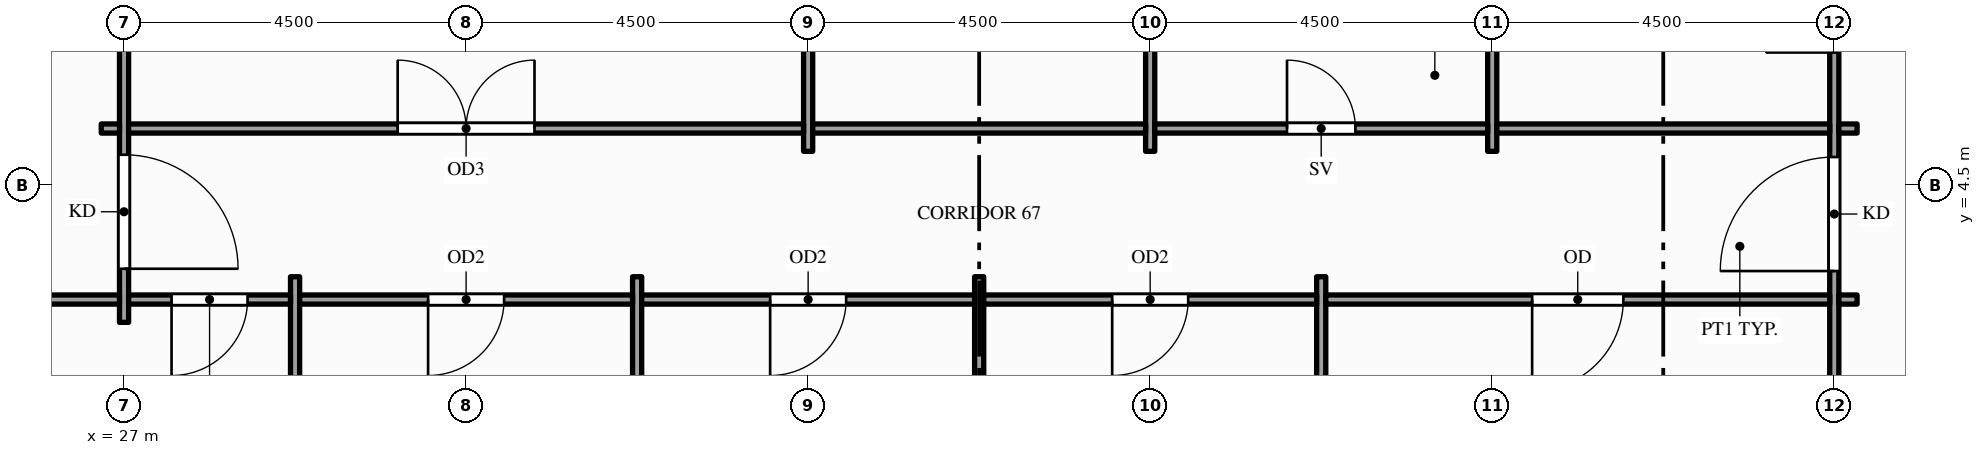
"""IFC4 building model, lengths in metres.
Left out: names, types, materials, properties, quantities, classifications, styles, units other than length and angle.
Written with IfcOpenShell. Run it as: python <this file> out.ifc"""

import sys

from ifc_helpers import new_model, si_unit, direction, frame, frame_2d, origin, place, context, subcontext, project, spatial, rectangle, extrude, element, fill, save


model = new_model("IFC4")
c1 = context("Model", 3, precision=1e-05, world=origin(), true_north=direction((0.0, 1.0)))
c2 = subcontext(c1, "Body", "Model", "MODEL_VIEW")
j1 = project(units=[si_unit("LENGTHUNIT", "METRE"), si_unit("PLANEANGLEUNIT", "RADIAN")], contexts=[c1])
p1 = place(None, origin())
s1 = spatial("IfcSite", under=j1, at=p1, CompositionType="ELEMENT")
p2 = place(p1, origin())
s2 = spatial("IfcBuilding", under=s1, at=p2, CompositionType="ELEMENT")
p3 = place(p2, frame((0.0, 0.0, 199.0)))
s3 = spatial("IfcBuildingStorey", under=s2, at=p3, CompositionType="ELEMENT", Elevation=199.0)
p4 = place(p3, frame((27.0, 2.7, 0.0), z_axis=(0.0, 0.0, 1.0), x_axis=(0.0, 1.0, 0.0)))
e1 = element("IfcWall", 1, at=p4, inside=s3, PredefinedType="PARTITIONING", context=c2, shape_type="SweptSolid", body=[
    extrude(rectangle(XDim=14.1, YDim=0.12, at=frame_2d((7.05, 0.0))), origin(), (0.0, 0.0, 1.0), 2.87),
])
p5 = place(p4, frame((0.705, 0.0, 0.0)))
e2 = element("IfcOpeningElement", 2, at=p5, cuts=e1, PredefinedType="OPENING", context=c2, shape_type="SweptSolid", body=[
    extrude(rectangle(XDim=1.5, YDim=2.1, at=frame_2d((0.75, 1.05))), frame((0.0, 0.07, 0.0), z_axis=(0.0, -1.0, 0.0), x_axis=(1.0, 0.0, 0.0)), (0.0, 0.0, 1.0), 0.14),
])
p6 = place(p4, frame((11.895, 0.0, 0.0)))
e3 = element("IfcOpeningElement", 3, at=p6, cuts=e1, PredefinedType="OPENING", context=c2, shape_type="SweptSolid", body=[
    extrude(rectangle(XDim=1.5, YDim=2.1, at=frame_2d((0.75, 1.05))), frame((0.0, 0.07, 0.0), z_axis=(0.0, -1.0, 0.0), x_axis=(1.0, 0.0, 0.0)), (0.0, 0.0, 1.0), 0.14),
])
for number, where, z_axis, x_axis in (
    (4, (29.25, -1.35, 0.0), (0.0, 0.0, 1.0), (0.0, 1.0, 0.0)),
    (5, (33.75, -1.35, 0.0), (0.0, 0.0, 1.0), (0.0, 1.0, 0.0)),
):
    element("IfcWall", number, at=place(p3, frame(where, z_axis=z_axis, x_axis=x_axis)), inside=s3, PredefinedType="PARTITIONING", context=c2, shape_type="SweptSolid", body=[
        extrude(rectangle(XDim=4.65, YDim=0.12, at=frame_2d((2.325, 0.0))), origin(), (0.0, 0.0, 1.0), 2.87),
    ])
p7 = place(p3, frame((36.0, 4.95, 0.0), z_axis=(0.0, 0.0, 1.0), x_axis=(0.0, 1.0, 0.0)))
e6 = element("IfcWall", 6, at=p7, inside=s3, PredefinedType="PARTITIONING", context=c2, shape_type="SweptSolid", body=[
    extrude(rectangle(XDim=9.6, YDim=0.12, at=frame_2d((4.8, 0.0))), origin(), (0.0, 0.0, 1.0), 2.87),
])
p8 = place(p3, frame((38.25, -1.35, 0.0), z_axis=(0.0, 0.0, 1.0), x_axis=(0.0, 1.0, 0.0)))
e7 = element("IfcWall", 7, at=p8, inside=s3, PredefinedType="PARTITIONING", context=c2, shape_type="SweptSolid", body=[
    extrude(rectangle(XDim=4.65, YDim=0.12, at=frame_2d((2.325, 0.0))), origin(), (0.0, 0.0, 1.0), 2.87),
])
p9 = place(p3, frame((40.5, 4.95, 0.0), z_axis=(0.0, 0.0, 1.0), x_axis=(0.0, 1.0, 0.0)))
e8 = element("IfcWall", 8, at=p9, inside=s3, PredefinedType="PARTITIONING", context=c2, shape_type="SweptSolid", body=[
    extrude(rectangle(XDim=9.6, YDim=0.12, at=frame_2d((4.8, 0.0))), origin(), (0.0, 0.0, 1.0), 2.87),
])
p10 = place(p3, frame((42.75, -1.35, 0.0), z_axis=(0.0, 0.0, 1.0), x_axis=(0.0, 1.0, 0.0)))
e9 = element("IfcWall", 9, at=p10, inside=s3, PredefinedType="PARTITIONING", context=c2, shape_type="SweptSolid", body=[
    extrude(rectangle(XDim=4.65, YDim=0.12, at=frame_2d((2.325, 0.0))), origin(), (0.0, 0.0, 1.0), 2.87),
])
p11 = place(p3, frame((45.0, 4.95, 0.0), z_axis=(0.0, 0.0, 1.0), x_axis=(0.0, 1.0, 0.0)))
e10 = element("IfcWall", 10, at=p11, inside=s3, PredefinedType="PARTITIONING", context=c2, shape_type="SweptSolid", body=[
    extrude(rectangle(XDim=9.6, YDim=0.12, at=frame_2d((4.8, 0.0))), origin(), (0.0, 0.0, 1.0), 2.87),
])
p12 = place(p3, frame((49.5, -1.35, 0.0), z_axis=(0.0, 0.0, 1.0), x_axis=(0.0, 1.0, 0.0)))
e11 = element("IfcWall", 11, at=p12, inside=s3, PredefinedType="PARTITIONING", context=c2, shape_type="SweptSolid", body=[
    extrude(rectangle(XDim=22.2, YDim=0.12, at=frame_2d((11.1, 0.0))), origin(), (0.0, 0.0, 1.0), 2.87),
])
p13 = place(p12, frame((4.725, 0.0, 0.0)))
e12 = element("IfcOpeningElement", 12, at=p13, cuts=e11, PredefinedType="OPENING", context=c2, shape_type="SweptSolid", body=[
    extrude(rectangle(XDim=1.5, YDim=2.1, at=frame_2d((0.75, 1.05))), frame((0.0, 0.07, 0.0), z_axis=(0.0, -1.0, 0.0), x_axis=(1.0, 0.0, 0.0)), (0.0, 0.0, 1.0), 0.14),
])
p14 = place(p12, frame((15.975, 0.0, 0.0)))
e13 = element("IfcOpeningElement", 13, at=p14, cuts=e11, PredefinedType="OPENING", context=c2, shape_type="SweptSolid", body=[
    extrude(rectangle(XDim=1.5, YDim=2.1, at=frame_2d((0.75, 1.05))), frame((0.0, 0.07, 0.0), z_axis=(0.0, -1.0, 0.0), x_axis=(1.0, 0.0, 0.0)), (0.0, 0.0, 1.0), 0.14),
])
p15 = place(p12, frame((7.6, 0.0, 0.0)))
e14 = element("IfcOpeningElement", 14, at=p15, cuts=e11, PredefinedType="OPENING", context=c2, shape_type="SweptSolid", body=[
    extrude(rectangle(XDim=0.9, YDim=2.1, at=frame_2d((0.45, 1.05))), frame((0.0, 0.07, 0.0), z_axis=(0.0, -1.0, 0.0), x_axis=(1.0, 0.0, 0.0)), (0.0, 0.0, 1.0), 0.14),
])
p16 = place(p12, frame((10.65, 0.0, 0.0)))
e15 = element("IfcOpeningElement", 15, at=p16, cuts=e11, PredefinedType="OPENING", context=c2, shape_type="SweptSolid", body=[
    extrude(rectangle(XDim=0.9, YDim=2.1, at=frame_2d((0.45, 1.05))), frame((0.0, 0.07, 0.0), z_axis=(0.0, -1.0, 0.0), x_axis=(1.0, 0.0, 0.0)), (0.0, 0.0, 1.0), 0.14),
])
p17 = place(p12, frame((13.6, 0.0, 0.0)))
e16 = element("IfcOpeningElement", 16, at=p17, cuts=e11, PredefinedType="OPENING", context=c2, shape_type="SweptSolid", body=[
    extrude(rectangle(XDim=1.0, YDim=2.1, at=frame_2d((0.5, 1.05))), frame((0.0, 0.07, 0.0), z_axis=(0.0, -1.0, 0.0), x_axis=(1.0, 0.0, 0.0)), (0.0, 0.0, 1.0), 0.14),
])
p18 = place(p3, frame((24.81, 3.0, 0.0), z_axis=(0.0, 0.0, 1.0), x_axis=(1.0, 0.0, 0.0)))
e17 = element("IfcWall", 17, at=p18, inside=s3, PredefinedType="PARTITIONING", context=c2, shape_type="SweptSolid", body=[
    extrude(rectangle(XDim=2.13, YDim=0.12, at=frame_2d((1.065, 0.0))), origin(), (0.0, 0.0, 1.0), 2.76),
])
p19 = place(p3, frame((27.06, 3.0, 0.0), z_axis=(0.0, 0.0, 1.0), x_axis=(1.0, 0.0, 0.0)))
e18 = element("IfcWall", 18, at=p19, inside=s3, PredefinedType="PARTITIONING", context=c2, shape_type="SweptSolid", body=[
    extrude(rectangle(XDim=2.13, YDim=0.12, at=frame_2d((1.065, 0.0))), origin(), (0.0, 0.0, 1.0), 2.87),
])
p20 = place(p19, frame((0.565, 0.0, 0.0)))
e19 = element("IfcOpeningElement", 19, at=p20, cuts=e18, PredefinedType="OPENING", context=c2, shape_type="SweptSolid", body=[
    extrude(rectangle(XDim=1.0, YDim=2.1, at=frame_2d((0.5, 1.05))), frame((0.0, 0.07, 0.0), z_axis=(0.0, -1.0, 0.0), x_axis=(1.0, 0.0, 0.0)), (0.0, 0.0, 1.0), 0.14),
])
p21 = place(p3, frame((29.31, 3.0, 0.0), z_axis=(0.0, 0.0, 1.0), x_axis=(1.0, 0.0, 0.0)))
e20 = element("IfcWall", 20, at=p21, inside=s3, PredefinedType="PARTITIONING", context=c2, shape_type="SweptSolid", body=[
    extrude(rectangle(XDim=4.38, YDim=0.12, at=frame_2d((2.19, 0.0))), origin(), (0.0, 0.0, 1.0), 2.87),
])
p22 = place(p21, frame((1.69, 0.0, 0.0)))
e21 = element("IfcOpeningElement", 21, at=p22, cuts=e20, PredefinedType="OPENING", context=c2, shape_type="SweptSolid", body=[
    extrude(rectangle(XDim=1.0, YDim=2.1, at=frame_2d((0.5, 1.05))), frame((0.0, 0.07, 0.0), z_axis=(0.0, -1.0, 0.0), x_axis=(1.0, 0.0, 0.0)), (0.0, 0.0, 1.0), 0.14),
])
p23 = place(p3, frame((33.81, 3.0, 0.0), z_axis=(0.0, 0.0, 1.0), x_axis=(1.0, 0.0, 0.0)))
e22 = element("IfcWall", 22, at=p23, inside=s3, PredefinedType="PARTITIONING", context=c2, shape_type="SweptSolid", body=[
    extrude(rectangle(XDim=4.38, YDim=0.12, at=frame_2d((2.19, 0.0))), origin(), (0.0, 0.0, 1.0), 2.87),
])
p24 = place(p23, frame((1.69, 0.0, 0.0)))
e23 = element("IfcOpeningElement", 23, at=p24, cuts=e22, PredefinedType="OPENING", context=c2, shape_type="SweptSolid", body=[
    extrude(rectangle(XDim=1.0, YDim=2.1, at=frame_2d((0.5, 1.05))), frame((0.0, 0.07, 0.0), z_axis=(0.0, -1.0, 0.0), x_axis=(1.0, 0.0, 0.0)), (0.0, 0.0, 1.0), 0.14),
])
p25 = place(p3, frame((38.31, 3.0, 0.0), z_axis=(0.0, 0.0, 1.0), x_axis=(1.0, 0.0, 0.0)))
e24 = element("IfcWall", 24, at=p25, inside=s3, PredefinedType="PARTITIONING", context=c2, shape_type="SweptSolid", body=[
    extrude(rectangle(XDim=4.38, YDim=0.12, at=frame_2d((2.19, 0.0))), origin(), (0.0, 0.0, 1.0), 2.87),
])
p26 = place(p25, frame((1.69, 0.0, 0.0)))
e25 = element("IfcOpeningElement", 25, at=p26, cuts=e24, PredefinedType="OPENING", context=c2, shape_type="SweptSolid", body=[
    extrude(rectangle(XDim=1.0, YDim=2.1, at=frame_2d((0.5, 1.05))), frame((0.0, 0.07, 0.0), z_axis=(0.0, -1.0, 0.0), x_axis=(1.0, 0.0, 0.0)), (0.0, 0.0, 1.0), 0.14),
])
p27 = place(p3, frame((42.81, 3.0, 0.0), z_axis=(0.0, 0.0, 1.0), x_axis=(1.0, 0.0, 0.0)))
e26 = element("IfcWall", 26, at=p27, inside=s3, PredefinedType="PARTITIONING", context=c2, shape_type="SweptSolid", body=[
    extrude(rectangle(XDim=6.63, YDim=0.12, at=frame_2d((3.315, 0.0))), origin(), (0.0, 0.0, 1.0), 2.87),
])
p28 = place(p27, frame((2.715, 0.0, 0.0)))
e27 = element("IfcOpeningElement", 27, at=p28, cuts=e26, PredefinedType="OPENING", context=c2, shape_type="SweptSolid", body=[
    extrude(rectangle(XDim=1.2, YDim=2.1, at=frame_2d((0.6, 1.05))), frame((0.0, 0.07, 0.0), z_axis=(0.0, -1.0, 0.0), x_axis=(1.0, 0.0, 0.0)), (0.0, 0.0, 1.0), 0.14),
])
for number, where, z_axis, x_axis in (
    (28, (49.56, 3.0, 0.0), (0.0, 0.0, 1.0), (1.0, 0.0, 0.0)),
    (29, (26.7, 5.25, 0.0), (0.0, 0.0, 1.0), (1.0, 0.0, 0.0)),
):
    element("IfcWall", number, at=place(p3, frame(where, z_axis=z_axis, x_axis=x_axis)), inside=s3, PredefinedType="PARTITIONING", context=c2, shape_type="SweptSolid", body=[
        extrude(rectangle(XDim=0.24, YDim=0.12, at=frame_2d((0.12, 0.0))), origin(), (0.0, 0.0, 1.0), 2.87),
    ])
p29 = place(p3, frame((27.06, 5.25, 0.0), z_axis=(0.0, 0.0, 1.0), x_axis=(1.0, 0.0, 0.0)))
e30 = element("IfcWall", 30, at=p29, inside=s3, PredefinedType="PARTITIONING", context=c2, shape_type="SweptSolid", body=[
    extrude(rectangle(XDim=8.88, YDim=0.12, at=frame_2d((4.44, 0.0))), origin(), (0.0, 0.0, 1.0), 2.87),
])
p30 = place(p29, frame((3.54, 0.0, 0.0)))
e31 = element("IfcOpeningElement", 31, at=p30, cuts=e30, PredefinedType="OPENING", context=c2, shape_type="SweptSolid", body=[
    extrude(rectangle(XDim=1.8, YDim=2.1, at=frame_2d((0.9, 1.05))), frame((0.0, 0.07, 0.0), z_axis=(0.0, -1.0, 0.0), x_axis=(1.0, 0.0, 0.0)), (0.0, 0.0, 1.0), 0.14),
])
p31 = place(p3, frame((36.06, 5.25, 0.0), z_axis=(0.0, 0.0, 1.0), x_axis=(1.0, 0.0, 0.0)))
e32 = element("IfcWall", 32, at=p31, inside=s3, PredefinedType="PARTITIONING", context=c2, shape_type="SweptSolid", body=[
    extrude(rectangle(XDim=4.38, YDim=0.12, at=frame_2d((2.19, 0.0))), origin(), (0.0, 0.0, 1.0), 2.87),
])
p32 = place(p3, frame((40.56, 5.25, 0.0), z_axis=(0.0, 0.0, 1.0), x_axis=(1.0, 0.0, 0.0)))
e33 = element("IfcWall", 33, at=p32, inside=s3, PredefinedType="PARTITIONING", context=c2, shape_type="SweptSolid", body=[
    extrude(rectangle(XDim=4.38, YDim=0.12, at=frame_2d((2.19, 0.0))), origin(), (0.0, 0.0, 1.0), 2.87),
])
p33 = place(p32, frame((1.74, 0.0, 0.0)))
e34 = element("IfcOpeningElement", 34, at=p33, cuts=e33, PredefinedType="OPENING", context=c2, shape_type="SweptSolid", body=[
    extrude(rectangle(XDim=0.9, YDim=2.1, at=frame_2d((0.45, 1.05))), frame((0.0, 0.07, 0.0), z_axis=(0.0, -1.0, 0.0), x_axis=(1.0, 0.0, 0.0)), (0.0, 0.0, 1.0), 0.14),
])
p34 = place(p3, frame((45.06, 5.25, 0.0), z_axis=(0.0, 0.0, 1.0), x_axis=(1.0, 0.0, 0.0)))
e35 = element("IfcWall", 35, at=p34, inside=s3, PredefinedType="PARTITIONING", context=c2, shape_type="SweptSolid", body=[
    extrude(rectangle(XDim=4.38, YDim=0.12, at=frame_2d((2.19, 0.0))), origin(), (0.0, 0.0, 1.0), 2.87),
])
p35 = place(p3, frame((49.56, 5.25, 0.0), z_axis=(0.0, 0.0, 1.0), x_axis=(1.0, 0.0, 0.0)))
e36 = element("IfcWall", 36, at=p35, inside=s3, PredefinedType="PARTITIONING", context=c2, shape_type="SweptSolid", body=[
    extrude(rectangle(XDim=0.24, YDim=0.12, at=frame_2d((0.12, 0.0))), origin(), (0.0, 0.0, 1.0), 2.87),
])
p36 = place(p5, origin())
e37 = element("IfcDoor", 37, at=p36, inside=s3, OperationType="SINGLE_SWING_LEFT", PredefinedType="DOOR", context=c2, shape_type="SweptSolid", body=[
    extrude(rectangle(XDim=1.5, YDim=2.1, at=frame_2d((0.75, 1.05))), frame((0.0, 0.025, 0.0), z_axis=(0.0, -1.0, 0.0), x_axis=(1.0, 0.0, 0.0)), (0.0, 0.0, 1.0), 0.05),
])
fill(e2, e37)
p37 = place(p13, origin())
e38 = element("IfcDoor", 38, at=p37, inside=s3, OperationType="SINGLE_SWING_LEFT", PredefinedType="DOOR", context=c2, shape_type="SweptSolid", body=[
    extrude(rectangle(XDim=1.5, YDim=2.1, at=frame_2d((0.75, 1.05))), frame((0.0, 0.025, 0.0), z_axis=(0.0, -1.0, 0.0), x_axis=(1.0, 0.0, 0.0)), (0.0, 0.0, 1.0), 0.05),
])
fill(e12, e38)
p38 = place(p30, origin())
e39 = element("IfcDoor", 39, at=p38, inside=s3, OperationType="DOUBLE_DOOR_SINGLE_SWING", PredefinedType="DOOR", context=c2, shape_type="SweptSolid", body=[
    extrude(rectangle(XDim=1.8, YDim=2.1, at=frame_2d((0.9, 1.05))), frame((0.0, 0.025, 0.0), z_axis=(0.0, -1.0, 0.0), x_axis=(1.0, 0.0, 0.0)), (0.0, 0.0, 1.0), 0.05),
])
fill(e31, e39)
p39 = place(p33, origin())
e40 = element("IfcDoor", 40, at=p39, inside=s3, OperationType="SINGLE_SWING_LEFT", PredefinedType="DOOR", context=c2, shape_type="SweptSolid", body=[
    extrude(rectangle(XDim=0.9, YDim=2.1, at=frame_2d((0.45, 1.05))), frame((0.0, 0.025, 0.0), z_axis=(0.0, -1.0, 0.0), x_axis=(1.0, 0.0, 0.0)), (0.0, 0.0, 1.0), 0.05),
])
fill(e34, e40)
p40 = place(p20, origin())
e41 = element("IfcDoor", 41, at=p40, inside=s3, OperationType="SINGLE_SWING_LEFT", PredefinedType="DOOR", context=c2, shape_type="SweptSolid", body=[
    extrude(rectangle(XDim=1.0, YDim=2.1, at=frame_2d((0.5, 1.05))), frame((0.0, 0.025, 0.0), z_axis=(0.0, -1.0, 0.0), x_axis=(1.0, 0.0, 0.0)), (0.0, 0.0, 1.0), 0.05),
])
fill(e19, e41)
p41 = place(p22, origin())
e42 = element("IfcDoor", 42, at=p41, inside=s3, OperationType="SINGLE_SWING_LEFT", PredefinedType="DOOR", context=c2, shape_type="SweptSolid", body=[
    extrude(rectangle(XDim=1.0, YDim=2.1, at=frame_2d((0.5, 1.05))), frame((0.0, 0.025, 0.0), z_axis=(0.0, -1.0, 0.0), x_axis=(1.0, 0.0, 0.0)), (0.0, 0.0, 1.0), 0.05),
])
fill(e21, e42)
p42 = place(p24, origin())
e43 = element("IfcDoor", 43, at=p42, inside=s3, OperationType="SINGLE_SWING_LEFT", PredefinedType="DOOR", context=c2, shape_type="SweptSolid", body=[
    extrude(rectangle(XDim=1.0, YDim=2.1, at=frame_2d((0.5, 1.05))), frame((0.0, 0.025, 0.0), z_axis=(0.0, -1.0, 0.0), x_axis=(1.0, 0.0, 0.0)), (0.0, 0.0, 1.0), 0.05),
])
fill(e23, e43)
p43 = place(p26, origin())
e44 = element("IfcDoor", 44, at=p43, inside=s3, OperationType="SINGLE_SWING_LEFT", PredefinedType="DOOR", context=c2, shape_type="SweptSolid", body=[
    extrude(rectangle(XDim=1.0, YDim=2.1, at=frame_2d((0.5, 1.05))), frame((0.0, 0.025, 0.0), z_axis=(0.0, -1.0, 0.0), x_axis=(1.0, 0.0, 0.0)), (0.0, 0.0, 1.0), 0.05),
])
fill(e25, e44)
p44 = place(p28, origin())
e45 = element("IfcDoor", 45, at=p44, inside=s3, OperationType="SINGLE_SWING_LEFT", PredefinedType="DOOR", context=c2, shape_type="SweptSolid", body=[
    extrude(rectangle(XDim=1.2, YDim=2.1, at=frame_2d((0.6, 1.05))), frame((0.0, 0.025, 0.0), z_axis=(0.0, -1.0, 0.0), x_axis=(1.0, 0.0, 0.0)), (0.0, 0.0, 1.0), 0.05),
])
fill(e27, e45)
save(model, sys.argv[1])
